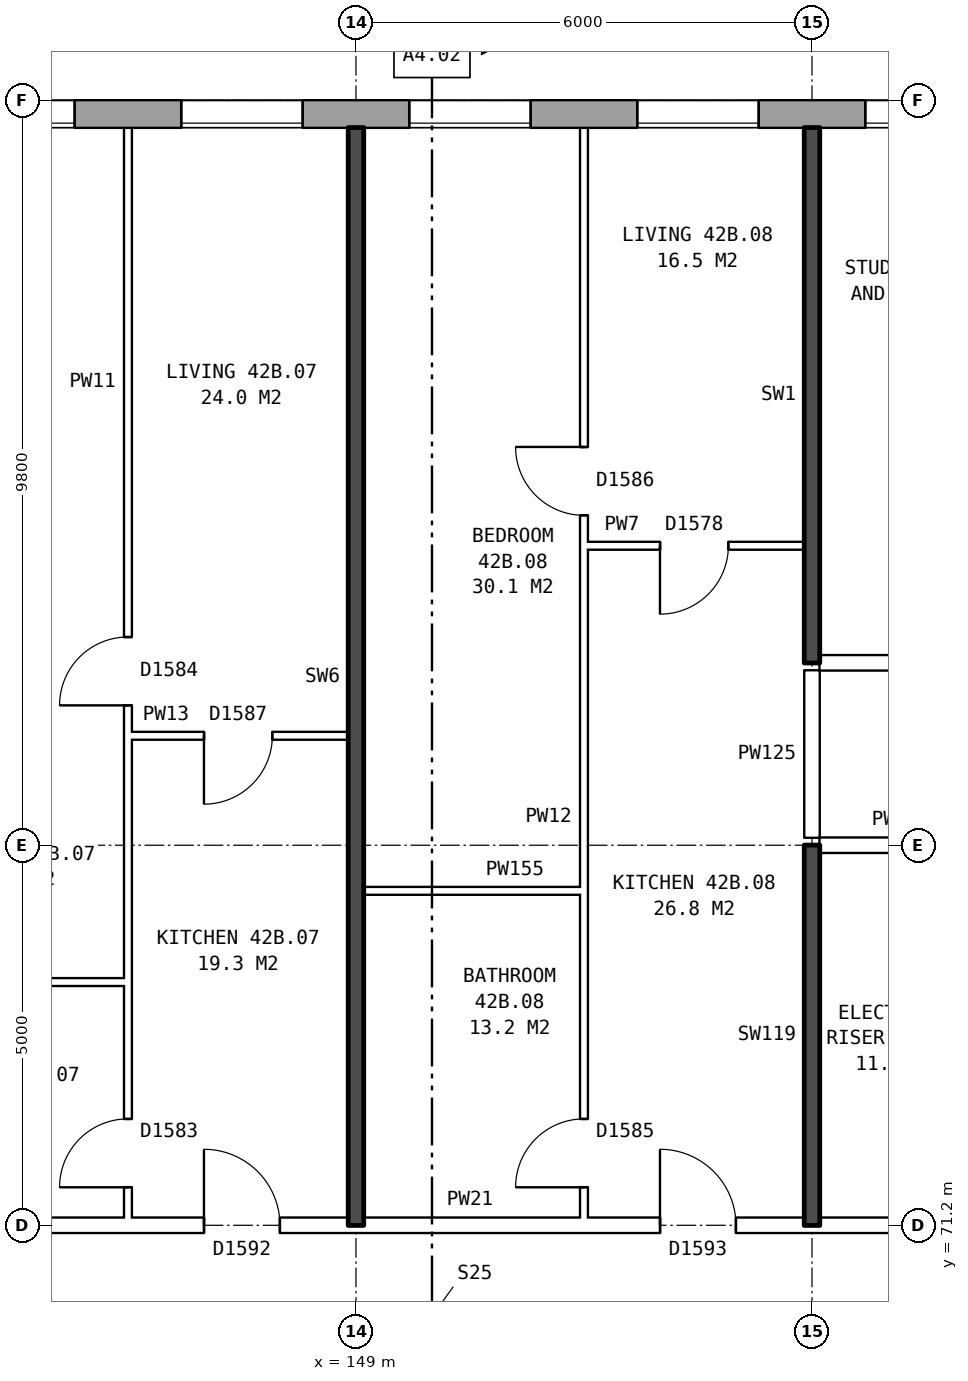
"""IFC4 building model, lengths in metres.
Left out: names, types, materials, properties, quantities, classifications, styles, units other than length and angle.
Written with IfcOpenShell. Run it as: python <this file> out.ifc"""

import sys

from ifc_helpers import new_model, si_unit, direction, frame, frame_2d, origin, place, context, subcontext, project, spatial, rectangle, extrude, element, fill, save


model = new_model("IFC4")
c1 = context("Model", 3, precision=1e-05, world=origin(), true_north=direction((0.0, 1.0)))
c2 = subcontext(c1, "Body", "Model", "MODEL_VIEW")
j1 = project(units=[si_unit("LENGTHUNIT", "METRE"), si_unit("PLANEANGLEUNIT", "RADIAN")], contexts=[c1])
p1 = place(None, origin())
s1 = spatial("IfcSite", under=j1, at=p1, CompositionType="ELEMENT")
p2 = place(p1, origin())
s2 = spatial("IfcBuilding", under=s1, at=p2, CompositionType="ELEMENT")
p3 = place(p2, frame((0.0, 0.0, 151.6)))
s3 = spatial("IfcBuildingStorey", under=s2, at=p3, CompositionType="ELEMENT", Elevation=151.6)
p4 = place(p3, frame((168.425, 85.82, 0.0), z_axis=(0.0, 0.0, 1.0), x_axis=(-1.0, 0.0, 0.0)))
e1 = element("IfcWall", 1, at=p4, inside=s3, PredefinedType="STANDARD", context=c2, shape_type="SweptSolid", body=[
    extrude(rectangle(XDim=34.351, YDim=0.36, at=frame_2d((17.175, 0.0))), origin(), (0.0, 0.0, 1.0), 2.85),
])
p5 = place(p4, frame((3.225, 0.0, 0.8)))
e2 = element("IfcOpeningElement", 2, at=p5, cuts=e1, PredefinedType="OPENING", context=c2, shape_type="SweptSolid", body=[
    extrude(rectangle(XDim=0.6, YDim=0.9, at=frame_2d((0.3, 0.45))), frame((0.0, 0.19, 0.0), z_axis=(0.0, -1.0, 0.0), x_axis=(1.0, 0.0, 0.0)), (0.0, 0.0, 1.0), 0.38),
])
p6 = place(p4, frame((5.125, 0.0, 0.8)))
e3 = element("IfcOpeningElement", 3, at=p6, cuts=e1, PredefinedType="OPENING", context=c2, shape_type="SweptSolid", body=[
    extrude(rectangle(XDim=1.6, YDim=1.8, at=frame_2d((0.8, 0.9))), frame((0.0, 0.19, 0.0), z_axis=(0.0, -1.0, 0.0), x_axis=(1.0, 0.0, 0.0)), (0.0, 0.0, 1.0), 0.38),
])
p7 = place(p4, frame((8.125, 0.0, 0.8)))
e4 = element("IfcOpeningElement", 4, at=p7, cuts=e1, PredefinedType="OPENING", context=c2, shape_type="SweptSolid", body=[
    extrude(rectangle(XDim=1.6, YDim=1.8, at=frame_2d((0.8, 0.9))), frame((0.0, 0.19, 0.0), z_axis=(0.0, -1.0, 0.0), x_axis=(1.0, 0.0, 0.0)), (0.0, 0.0, 1.0), 0.38),
])
p8 = place(p4, frame((11.125, 0.0, 0.8)))
e5 = element("IfcOpeningElement", 5, at=p8, cuts=e1, PredefinedType="OPENING", context=c2, shape_type="SweptSolid", body=[
    extrude(rectangle(XDim=1.6, YDim=1.8, at=frame_2d((0.8, 0.9))), frame((0.0, 0.19, 0.0), z_axis=(0.0, -1.0, 0.0), x_axis=(1.0, 0.0, 0.0)), (0.0, 0.0, 1.0), 0.38),
])
p9 = place(p4, frame((14.125, 0.0, 0.8)))
e6 = element("IfcOpeningElement", 6, at=p9, cuts=e1, PredefinedType="OPENING", context=c2, shape_type="SweptSolid", body=[
    extrude(rectangle(XDim=1.6, YDim=1.8, at=frame_2d((0.8, 0.9))), frame((0.0, 0.19, 0.0), z_axis=(0.0, -1.0, 0.0), x_axis=(1.0, 0.0, 0.0)), (0.0, 0.0, 1.0), 0.38),
])
p10 = place(p4, frame((17.125, 0.0, 0.8)))
e7 = element("IfcOpeningElement", 7, at=p10, cuts=e1, PredefinedType="OPENING", context=c2, shape_type="SweptSolid", body=[
    extrude(rectangle(XDim=1.6, YDim=1.8, at=frame_2d((0.8, 0.9))), frame((0.0, 0.19, 0.0), z_axis=(0.0, -1.0, 0.0), x_axis=(1.0, 0.0, 0.0)), (0.0, 0.0, 1.0), 0.38),
])
p11 = place(p4, frame((20.125, 0.0, 0.8)))
e8 = element("IfcOpeningElement", 8, at=p11, cuts=e1, PredefinedType="OPENING", context=c2, shape_type="SweptSolid", body=[
    extrude(rectangle(XDim=1.6, YDim=1.8, at=frame_2d((0.8, 0.9))), frame((0.0, 0.19, 0.0), z_axis=(0.0, -1.0, 0.0), x_axis=(1.0, 0.0, 0.0)), (0.0, 0.0, 1.0), 0.38),
])
p12 = place(p4, frame((23.125, 0.0, 0.8)))
e9 = element("IfcOpeningElement", 9, at=p12, cuts=e1, PredefinedType="OPENING", context=c2, shape_type="SweptSolid", body=[
    extrude(rectangle(XDim=1.6, YDim=1.8, at=frame_2d((0.8, 0.9))), frame((0.0, 0.19, 0.0), z_axis=(0.0, -1.0, 0.0), x_axis=(1.0, 0.0, 0.0)), (0.0, 0.0, 1.0), 0.38),
])
p13 = place(p4, frame((26.125, 0.0, 0.8)))
e10 = element("IfcOpeningElement", 10, at=p13, cuts=e1, PredefinedType="OPENING", context=c2, shape_type="SweptSolid", body=[
    extrude(rectangle(XDim=1.6, YDim=1.8, at=frame_2d((0.8, 0.9))), frame((0.0, 0.19, 0.0), z_axis=(0.0, -1.0, 0.0), x_axis=(1.0, 0.0, 0.0)), (0.0, 0.0, 1.0), 0.38),
])
p14 = place(p4, frame((28.025, 0.0, 0.8)))
e11 = element("IfcOpeningElement", 11, at=p14, cuts=e1, PredefinedType="OPENING", context=c2, shape_type="SweptSolid", body=[
    extrude(rectangle(XDim=1.4, YDim=1.8, at=frame_2d((0.7, 0.9))), frame((0.0, 0.19, 0.0), z_axis=(0.0, -1.0, 0.0), x_axis=(1.0, 0.0, 0.0)), (0.0, 0.0, 1.0), 0.38),
])
p15 = place(p4, frame((32.275, 0.0, 1.7)))
e12 = element("IfcOpeningElement", 12, at=p15, cuts=e1, PredefinedType="OPENING", context=c2, shape_type="SweptSolid", body=[
    extrude(rectangle(XDim=0.6, YDim=0.9, at=frame_2d((0.3, 0.45))), frame((0.0, 0.19, 0.0), z_axis=(0.0, -1.0, 0.0), x_axis=(1.0, 0.0, 0.0)), (0.0, 0.0, 1.0), 0.38),
])
p16 = place(p4, frame((4.225, 0.0, 0.8)))
e13 = element("IfcOpeningElement", 13, at=p16, cuts=e1, PredefinedType="OPENING", context=c2, shape_type="SweptSolid", body=[
    extrude(rectangle(XDim=0.6, YDim=1.8, at=frame_2d((0.3, 0.9))), frame((0.0, 0.19, 0.0), z_axis=(0.0, -1.0, 0.0), x_axis=(1.0, 0.0, 0.0)), (0.0, 0.0, 1.0), 0.38),
])
p17 = place(p4, frame((29.725, 0.0, 0.8)))
e14 = element("IfcOpeningElement", 14, at=p17, cuts=e1, PredefinedType="OPENING", context=c2, shape_type="SweptSolid", body=[
    extrude(rectangle(XDim=1.0, YDim=1.2, at=frame_2d((0.5, 0.6))), frame((0.0, 0.19, 0.0), z_axis=(0.0, -1.0, 0.0), x_axis=(1.0, 0.0, 0.0)), (0.0, 0.0, 1.0), 0.38),
])
p18 = place(p4, frame((33.225, 0.0, 0.8)))
e15 = element("IfcOpeningElement", 15, at=p18, cuts=e1, PredefinedType="OPENING", context=c2, shape_type="SweptSolid", body=[
    extrude(rectangle(XDim=0.8, YDim=1.8, at=frame_2d((0.4, 0.9))), frame((0.0, 0.19, 0.0), z_axis=(0.0, -1.0, 0.0), x_axis=(1.0, 0.0, 0.0)), (0.0, 0.0, 1.0), 0.38),
])
p19 = place(p3, frame((142.76, 71.2, 0.0), z_axis=(0.0, 0.0, 1.0), x_axis=(1.0, 0.0, 0.0)))
e16 = element("IfcWall", 16, at=p19, inside=s3, PredefinedType="PARTITIONING", context=c2, shape_type="SweptSolid", body=[
    extrude(rectangle(XDim=14.48, YDim=0.2, at=frame_2d((7.24, 0.0))), origin(), (0.0, 0.0, 1.0), 2.85),
])
p20 = place(p19, frame((4.24, 0.0, 0.0)))
e17 = element("IfcOpeningElement", 17, at=p20, cuts=e16, PredefinedType="OPENING", context=c2, shape_type="SweptSolid", body=[
    extrude(rectangle(XDim=1.0, YDim=2.1, at=frame_2d((0.5, 1.05))), frame((0.0, 0.11, 0.0), z_axis=(0.0, -1.0, 0.0), x_axis=(1.0, 0.0, 0.0)), (0.0, 0.0, 1.0), 0.22),
])
p21 = place(p19, frame((10.24, 0.0, 0.0)))
e18 = element("IfcOpeningElement", 18, at=p21, cuts=e16, PredefinedType="OPENING", context=c2, shape_type="SweptSolid", body=[
    extrude(rectangle(XDim=1.0, YDim=2.1, at=frame_2d((0.5, 1.05))), frame((0.0, 0.11, 0.0), z_axis=(0.0, -1.0, 0.0), x_axis=(1.0, 0.0, 0.0)), (0.0, 0.0, 1.0), 0.22),
])
p22 = place(p3, frame((142.76, 74.4, 0.0), z_axis=(0.0, 0.0, 1.0), x_axis=(1.0, 0.0, 0.0)))
e19 = element("IfcWall", 19, at=p22, inside=s3, PredefinedType="PARTITIONING", context=c2, shape_type="SweptSolid", body=[
    extrude(rectangle(XDim=3.24, YDim=0.1, at=frame_2d((1.62, 0.0))), origin(), (0.0, 0.0, 1.0), 2.85),
])
p23 = place(p3, frame((149.1, 75.6, 0.0), z_axis=(0.0, 0.0, 1.0), x_axis=(1.0, 0.0, 0.0)))
e20 = element("IfcWall", 20, at=p23, inside=s3, PredefinedType="PARTITIONING", context=c2, shape_type="SweptSolid", body=[
    extrude(rectangle(XDim=2.9, YDim=0.1, at=frame_2d((1.45, 0.0))), origin(), (0.0, 0.0, 1.0), 2.85),
])
p24 = place(p3, frame((155.1, 76.2, 0.0), z_axis=(0.0, 0.0, 1.0), x_axis=(1.0, 0.0, 0.0)))
e21 = element("IfcWall", 21, at=p24, inside=s3, PredefinedType="PARTITIONING", context=c2, shape_type="SweptSolid", body=[
    extrude(rectangle(XDim=2.14, YDim=0.2, at=frame_2d((1.07, 0.0))), origin(), (0.0, 0.0, 1.0), 2.85),
])
p25 = place(p3, frame((146.0, 77.64, 0.0), z_axis=(0.0, 0.0, 1.0), x_axis=(1.0, 0.0, 0.0)))
e22 = element("IfcWall", 22, at=p25, inside=s3, PredefinedType="PARTITIONING", context=c2, shape_type="SweptSolid", body=[
    extrude(rectangle(XDim=2.9, YDim=0.1, at=frame_2d((1.45, 0.0))), origin(), (0.0, 0.0, 1.0), 2.85),
])
p26 = place(p25, frame((1.0, 0.0, 0.0)))
e23 = element("IfcOpeningElement", 23, at=p26, cuts=e22, PredefinedType="OPENING", context=c2, shape_type="SweptSolid", body=[
    extrude(rectangle(XDim=0.9, YDim=2.1, at=frame_2d((0.45, 1.05))), frame((0.0, 0.06, 0.0), z_axis=(0.0, -1.0, 0.0), x_axis=(1.0, 0.0, 0.0)), (0.0, 0.0, 1.0), 0.12),
])
p27 = place(p3, frame((155.1, 78.6, 0.0), z_axis=(0.0, 0.0, 1.0), x_axis=(1.0, 0.0, 0.0)))
e24 = element("IfcWall", 24, at=p27, inside=s3, PredefinedType="PARTITIONING", context=c2, shape_type="SweptSolid", body=[
    extrude(rectangle(XDim=16.04, YDim=0.2, at=frame_2d((8.02, 0.0))), origin(), (0.0, 0.0, 1.0), 2.85),
])
p28 = place(p27, frame((1.45, 0.0, 0.0)))
e25 = element("IfcOpeningElement", 25, at=p28, cuts=e24, PredefinedType="OPENING", context=c2, shape_type="SweptSolid", body=[
    extrude(rectangle(XDim=1.0, YDim=2.1, at=frame_2d((0.5, 1.05))), frame((0.0, 0.11, 0.0), z_axis=(0.0, -1.0, 0.0), x_axis=(1.0, 0.0, 0.0)), (0.0, 0.0, 1.0), 0.22),
])
p29 = place(p27, frame((8.4, 0.0, 0.0)))
e26 = element("IfcOpeningElement", 26, at=p29, cuts=e24, PredefinedType="OPENING", context=c2, shape_type="SweptSolid", body=[
    extrude(rectangle(XDim=1.0, YDim=2.1, at=frame_2d((0.5, 1.05))), frame((0.0, 0.11, 0.0), z_axis=(0.0, -1.0, 0.0), x_axis=(1.0, 0.0, 0.0)), (0.0, 0.0, 1.0), 0.22),
])
p30 = place(p3, frame((152.0, 80.14, 0.0), z_axis=(0.0, 0.0, 1.0), x_axis=(1.0, 0.0, 0.0)))
e27 = element("IfcWall", 27, at=p30, inside=s3, PredefinedType="PARTITIONING", context=c2, shape_type="SweptSolid", body=[
    extrude(rectangle(XDim=2.9, YDim=0.1, at=frame_2d((1.45, 0.0))), origin(), (0.0, 0.0, 1.0), 2.85),
])
p31 = place(p30, frame((1.0, 0.0, 0.0)))
e28 = element("IfcOpeningElement", 28, at=p31, cuts=e27, PredefinedType="OPENING", context=c2, shape_type="SweptSolid", body=[
    extrude(rectangle(XDim=0.9, YDim=2.1, at=frame_2d((0.45, 1.05))), frame((0.0, 0.06, 0.0), z_axis=(0.0, -1.0, 0.0), x_axis=(1.0, 0.0, 0.0)), (0.0, 0.0, 1.0), 0.12),
])
p32 = place(p3, frame((146.0, 71.3, 0.0), z_axis=(0.0, 0.0, 1.0), x_axis=(0.0, 1.0, 0.0)))
e29 = element("IfcWall", 29, at=p32, inside=s3, PredefinedType="PARTITIONING", context=c2, shape_type="SweptSolid", body=[
    extrude(rectangle(XDim=14.34, YDim=0.1, at=frame_2d((7.17, 0.0))), origin(), (0.0, 0.0, 1.0), 2.85),
])
p33 = place(p32, frame((6.74, 0.0, 0.0)))
e30 = element("IfcOpeningElement", 30, at=p33, cuts=e29, PredefinedType="OPENING", context=c2, shape_type="SweptSolid", body=[
    extrude(rectangle(XDim=0.9, YDim=2.1, at=frame_2d((0.45, 1.05))), frame((0.0, 0.06, 0.0), z_axis=(0.0, -1.0, 0.0), x_axis=(1.0, 0.0, 0.0)), (0.0, 0.0, 1.0), 0.12),
])
p34 = place(p32, frame((0.4, 0.0, 0.0)))
e31 = element("IfcOpeningElement", 31, at=p34, cuts=e29, PredefinedType="OPENING", context=c2, shape_type="SweptSolid", body=[
    extrude(rectangle(XDim=0.9, YDim=2.1, at=frame_2d((0.45, 1.05))), frame((0.0, 0.06, 0.0), z_axis=(0.0, -1.0, 0.0), x_axis=(1.0, 0.0, 0.0)), (0.0, 0.0, 1.0), 0.12),
])
p35 = place(p3, frame((149.0, 71.2, 0.0), z_axis=(0.0, 0.0, 1.0), x_axis=(0.0, 1.0, 0.0)))
e32 = element("IfcWall", 32, at=p35, inside=s3, PredefinedType="SOLIDWALL", context=c2, shape_type="SweptSolid", body=[
    extrude(rectangle(XDim=14.44, YDim=0.2, at=frame_2d((7.22, 0.0))), origin(), (0.0, 0.0, 1.0), 2.85),
])
p36 = place(p3, frame((152.0, 71.3, 0.0), z_axis=(0.0, 0.0, 1.0), x_axis=(0.0, 1.0, 0.0)))
e33 = element("IfcWall", 33, at=p36, inside=s3, PredefinedType="PARTITIONING", context=c2, shape_type="SweptSolid", body=[
    extrude(rectangle(XDim=14.34, YDim=0.1, at=frame_2d((7.17, 0.0))), origin(), (0.0, 0.0, 1.0), 2.85),
])
p37 = place(p36, frame((9.24, 0.0, 0.0)))
e34 = element("IfcOpeningElement", 34, at=p37, cuts=e33, PredefinedType="OPENING", context=c2, shape_type="SweptSolid", body=[
    extrude(rectangle(XDim=0.9, YDim=2.1, at=frame_2d((0.45, 1.05))), frame((0.0, 0.06, 0.0), z_axis=(0.0, -1.0, 0.0), x_axis=(1.0, 0.0, 0.0)), (0.0, 0.0, 1.0), 0.12),
])
p38 = place(p36, frame((0.4, 0.0, 0.0)))
e35 = element("IfcOpeningElement", 35, at=p38, cuts=e33, PredefinedType="OPENING", context=c2, shape_type="SweptSolid", body=[
    extrude(rectangle(XDim=0.9, YDim=2.1, at=frame_2d((0.45, 1.05))), frame((0.0, 0.06, 0.0), z_axis=(0.0, -1.0, 0.0), x_axis=(1.0, 0.0, 0.0)), (0.0, 0.0, 1.0), 0.12),
])
p39 = place(p3, frame((155.0, 71.2, 0.0), z_axis=(0.0, 0.0, 1.0), x_axis=(0.0, 1.0, 0.0)))
e36 = element("IfcWall", 36, at=p39, inside=s3, PredefinedType="SOLIDWALL", context=c2, shape_type="SweptSolid", body=[
    extrude(rectangle(XDim=5.0, YDim=0.2, at=frame_2d((2.5, 0.0))), origin(), (0.0, 0.0, 1.0), 2.85),
])
p40 = place(p3, frame((155.0, 76.3, 0.0), z_axis=(0.0, 0.0, 1.0), x_axis=(0.0, 1.0, 0.0)))
e37 = element("IfcWall", 37, at=p40, inside=s3, PredefinedType="PARTITIONING", context=c2, shape_type="SweptSolid", body=[
    extrude(rectangle(XDim=2.2, YDim=0.2, at=frame_2d((1.1, 0.0))), origin(), (0.0, 0.0, 1.0), 2.85),
])
p41 = place(p3, frame((155.0, 78.6, 0.0), z_axis=(0.0, 0.0, 1.0), x_axis=(0.0, 1.0, 0.0)))
e38 = element("IfcWall", 38, at=p41, inside=s3, PredefinedType="SOLIDWALL", context=c2, shape_type="SweptSolid", body=[
    extrude(rectangle(XDim=7.04, YDim=0.2, at=frame_2d((3.52, 0.0))), origin(), (0.0, 0.0, 1.0), 2.85),
])
p42 = place(p8, origin())
e39 = element("IfcWindow", 39, at=p42, inside=s3, PartitioningType="SINGLE_PANEL", PredefinedType="WINDOW", context=c2, shape_type="SweptSolid", body=[
    extrude(rectangle(XDim=1.6, YDim=1.8, at=frame_2d((0.8, 0.9))), frame((0.0, 0.15, 0.0), z_axis=(0.0, -1.0, 0.0), x_axis=(1.0, 0.0, 0.0)), (0.0, 0.0, 1.0), 0.06),
])
fill(e5, e39)
p43 = place(p9, origin())
e40 = element("IfcWindow", 40, at=p43, inside=s3, PartitioningType="SINGLE_PANEL", PredefinedType="WINDOW", context=c2, shape_type="SweptSolid", body=[
    extrude(rectangle(XDim=1.6, YDim=1.8, at=frame_2d((0.8, 0.9))), frame((0.0, 0.15, 0.0), z_axis=(0.0, -1.0, 0.0), x_axis=(1.0, 0.0, 0.0)), (0.0, 0.0, 1.0), 0.06),
])
fill(e6, e40)
p44 = place(p10, origin())
e41 = element("IfcWindow", 41, at=p44, inside=s3, PartitioningType="SINGLE_PANEL", PredefinedType="WINDOW", context=c2, shape_type="SweptSolid", body=[
    extrude(rectangle(XDim=1.6, YDim=1.8, at=frame_2d((0.8, 0.9))), frame((0.0, 0.15, 0.0), z_axis=(0.0, -1.0, 0.0), x_axis=(1.0, 0.0, 0.0)), (0.0, 0.0, 1.0), 0.06),
])
fill(e7, e41)
p45 = place(p11, origin())
e42 = element("IfcWindow", 42, at=p45, inside=s3, PartitioningType="SINGLE_PANEL", PredefinedType="WINDOW", context=c2, shape_type="SweptSolid", body=[
    extrude(rectangle(XDim=1.6, YDim=1.8, at=frame_2d((0.8, 0.9))), frame((0.0, 0.15, 0.0), z_axis=(0.0, -1.0, 0.0), x_axis=(1.0, 0.0, 0.0)), (0.0, 0.0, 1.0), 0.06),
])
fill(e8, e42)
p46 = place(p12, origin())
e43 = element("IfcWindow", 43, at=p46, inside=s3, PartitioningType="SINGLE_PANEL", PredefinedType="WINDOW", context=c2, shape_type="SweptSolid", body=[
    extrude(rectangle(XDim=1.6, YDim=1.8, at=frame_2d((0.8, 0.9))), frame((0.0, 0.15, 0.0), z_axis=(0.0, -1.0, 0.0), x_axis=(1.0, 0.0, 0.0)), (0.0, 0.0, 1.0), 0.06),
])
fill(e9, e43)
p47 = place(p33, origin())
e44 = element("IfcDoor", 44, at=p47, inside=s3, OperationType="SINGLE_SWING_LEFT", PredefinedType="DOOR", context=c2, shape_type="SweptSolid", body=[
    extrude(rectangle(XDim=0.9, YDim=2.1, at=frame_2d((0.45, 1.05))), frame((0.0, 0.025, 0.0), z_axis=(0.0, -1.0, 0.0), x_axis=(1.0, 0.0, 0.0)), (0.0, 0.0, 1.0), 0.05),
])
fill(e30, e44)
p48 = place(p20, origin())
e45 = element("IfcDoor", 45, at=p48, inside=s3, OperationType="SINGLE_SWING_LEFT", PredefinedType="DOOR", context=c2, shape_type="SweptSolid", body=[
    extrude(rectangle(XDim=1.0, YDim=2.1, at=frame_2d((0.5, 1.05))), frame((0.0, 0.025, 0.0), z_axis=(0.0, -1.0, 0.0), x_axis=(1.0, 0.0, 0.0)), (0.0, 0.0, 1.0), 0.05),
])
fill(e17, e45)
p49 = place(p26, frame((0.9, 0.0, 0.0), z_axis=(0.0, 0.0, 1.0), x_axis=(-1.0, 0.0, 0.0)))
e46 = element("IfcDoor", 46, at=p49, inside=s3, OperationType="SINGLE_SWING_RIGHT", PredefinedType="DOOR", context=c2, shape_type="SweptSolid", body=[
    extrude(rectangle(XDim=0.9, YDim=2.1, at=frame_2d((0.45, 1.05))), frame((0.0, 0.025, 0.0), z_axis=(0.0, -1.0, 0.0), x_axis=(1.0, 0.0, 0.0)), (0.0, 0.0, 1.0), 0.05),
])
fill(e23, e46)
p50 = place(p34, origin())
e47 = element("IfcDoor", 47, at=p50, inside=s3, OperationType="SINGLE_SWING_LEFT", PredefinedType="DOOR", context=c2, shape_type="SweptSolid", body=[
    extrude(rectangle(XDim=0.9, YDim=2.1, at=frame_2d((0.45, 1.05))), frame((0.0, 0.025, 0.0), z_axis=(0.0, -1.0, 0.0), x_axis=(1.0, 0.0, 0.0)), (0.0, 0.0, 1.0), 0.05),
])
fill(e31, e47)
p51 = place(p37, origin())
e48 = element("IfcDoor", 48, at=p51, inside=s3, OperationType="SINGLE_SWING_RIGHT", PredefinedType="DOOR", context=c2, shape_type="SweptSolid", body=[
    extrude(rectangle(XDim=0.9, YDim=2.1, at=frame_2d((0.45, 1.05))), frame((0.0, 0.025, 0.0), z_axis=(0.0, -1.0, 0.0), x_axis=(1.0, 0.0, 0.0)), (0.0, 0.0, 1.0), 0.05),
])
fill(e34, e48)
p52 = place(p21, origin())
e49 = element("IfcDoor", 49, at=p52, inside=s3, OperationType="SINGLE_SWING_LEFT", PredefinedType="DOOR", context=c2, shape_type="SweptSolid", body=[
    extrude(rectangle(XDim=1.0, YDim=2.1, at=frame_2d((0.5, 1.05))), frame((0.0, 0.025, 0.0), z_axis=(0.0, -1.0, 0.0), x_axis=(1.0, 0.0, 0.0)), (0.0, 0.0, 1.0), 0.05),
])
fill(e18, e49)
p53 = place(p31, frame((0.9, 0.0, 0.0), z_axis=(0.0, 0.0, 1.0), x_axis=(-1.0, 0.0, 0.0)))
e50 = element("IfcDoor", 50, at=p53, inside=s3, OperationType="SINGLE_SWING_RIGHT", PredefinedType="DOOR", context=c2, shape_type="SweptSolid", body=[
    extrude(rectangle(XDim=0.9, YDim=2.1, at=frame_2d((0.45, 1.05))), frame((0.0, 0.025, 0.0), z_axis=(0.0, -1.0, 0.0), x_axis=(1.0, 0.0, 0.0)), (0.0, 0.0, 1.0), 0.05),
])
fill(e28, e50)
p54 = place(p38, origin())
e51 = element("IfcDoor", 51, at=p54, inside=s3, OperationType="SINGLE_SWING_LEFT", PredefinedType="DOOR", context=c2, shape_type="SweptSolid", body=[
    extrude(rectangle(XDim=0.9, YDim=2.1, at=frame_2d((0.45, 1.05))), frame((0.0, 0.025, 0.0), z_axis=(0.0, -1.0, 0.0), x_axis=(1.0, 0.0, 0.0)), (0.0, 0.0, 1.0), 0.05),
])
fill(e35, e51)
save(model, sys.argv[1])
